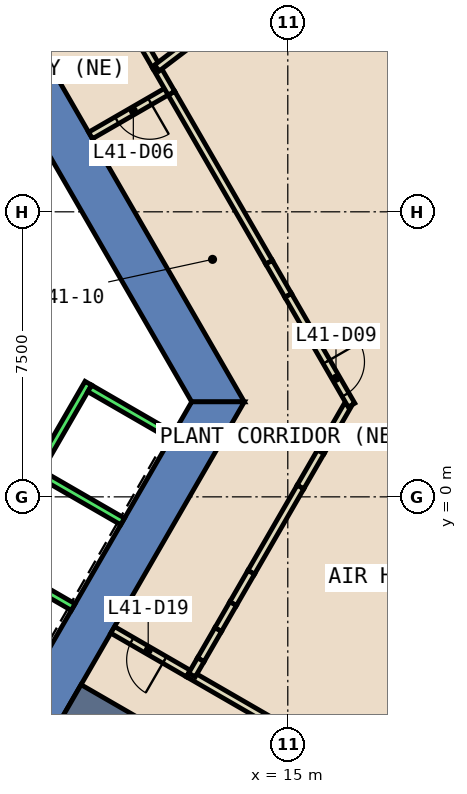
"""IFC4 building model, lengths in metres.
Left out: names, types, materials, properties, quantities, classifications, styles, units other than length and angle.
Written with IfcOpenShell. Run it as: python <this file> out.ifc"""

import sys

from ifc_helpers import new_model, si_unit, direction, frame, frame_2d, origin, place, context, subcontext, project, spatial, polyline, rectangle, outline, extrude, element, fill, save


model = new_model("IFC4")
c1 = context("Model", 3, precision=1e-05, world=origin(), true_north=direction((0.0, 1.0)))
c2 = subcontext(c1, "Body", "Model", "MODEL_VIEW")
j1 = project(units=[si_unit("LENGTHUNIT", "METRE"), si_unit("PLANEANGLEUNIT", "RADIAN")], contexts=[c1])
p1 = place(None, origin())
s1 = spatial("IfcSite", under=j1, at=p1, CompositionType="ELEMENT")
p2 = place(p1, origin())
s2 = spatial("IfcBuilding", under=s1, at=p2, CompositionType="ELEMENT")
p3 = place(p2, frame((0.0, 0.0, 184.4)))
s3 = spatial("IfcBuildingStorey", under=s2, at=p3, CompositionType="ELEMENT", Elevation=184.4)
p4 = place(p3, frame((0.0, 0.0, -0.6)))
e1 = element("IfcWall", 1, at=p4, inside=s3, PredefinedType="SHEAR", context=c2, shape_type="SweptSolid", body=[
    extrude(outline(polyline([(8.517, 11.747), (7.478, 11.147), (12.471, 2.5), (13.856, 2.5), (8.517, 11.747)])), origin(), (0.0, 0.0, 1.0), 5.4),
])
p5 = place(p3, frame((0.0, 0.0, -0.6)))
e2 = element("IfcWall", 2, at=p5, inside=s3, PredefinedType="SHEAR", context=c2, shape_type="SweptSolid", body=[
    extrude(outline(polyline([(6.928, -9.5), (13.856, 2.5), (12.471, 2.5), (6.235, -8.3), (6.928, -9.5)])), origin(), (0.0, 0.0, 1.0), 5.4),
])
p6 = place(p3, frame((9.31, -5.375, 0.0), z_axis=(0.0, 0.0, 1.0), x_axis=(0.866015103238, -0.500017840646, 0.0)))
e3 = element("IfcWall", 3, at=p6, inside=s3, PredefinedType="SHEAR", context=c2, shape_type="SweptSolid", body=[
    extrude(rectangle(XDim=27.139, YDim=1.0, at=frame_2d((13.57, 0.0))), origin(), (0.0, 0.0, 1.0), 4.8),
])
p7 = place(p3, frame((12.384, -4.65, 0.0), z_axis=(0.0, 0.0, 1.0), x_axis=(-0.866053019151, 0.499952165731, 0.0)))
e4 = element("IfcWall", 4, at=p7, inside=s3, PredefinedType="PARTITIONING", context=c2, shape_type="SweptSolid", body=[
    extrude(rectangle(XDim=2.3, YDim=0.2, at=frame_2d((1.15, 0.0))), origin(), (0.0, 0.0, 1.0), 4.8),
])
p8 = place(p7, frame((0.721, 0.0, 0.0)))
e5 = element("IfcOpeningElement", 5, at=p8, cuts=e4, PredefinedType="OPENING", context=c2, shape_type="SweptSolid", body=[
    extrude(rectangle(XDim=1.0, YDim=2.1, at=frame_2d((0.5, 1.05))), frame((0.0, 0.11, 0.0), z_axis=(0.0, -1.0, 0.0), x_axis=(1.0, 0.0, 0.0)), (0.0, 0.0, 1.0), 0.22),
])
p9 = place(p3, frame((12.384, -4.65, 0.0), z_axis=(0.0, 0.0, 1.0), x_axis=(0.866042267005, -0.499970790907, 0.0)))
e6 = element("IfcWall", 6, at=p9, inside=s3, PredefinedType="PARTITIONING", context=c2, shape_type="SweptSolid", body=[
    extrude(rectangle(XDim=25.02, YDim=0.2, at=frame_2d((12.51, 0.0))), origin(), (0.0, 0.0, 1.0), 4.8),
])
p10 = place(p3, frame((11.888, 10.709, 0.0), z_axis=(0.0, 0.0, 1.0), x_axis=(-0.865973769406, -0.500089422704, 0.0)))
e7 = element("IfcWall", 7, at=p10, inside=s3, PredefinedType="PARTITIONING", context=c2, shape_type="SweptSolid", body=[
    extrude(rectangle(XDim=2.399, YDim=0.2, at=frame_2d((1.2, 0.0))), origin(), (0.0, 0.0, 1.0), 2.4),
])
p11 = place(p10, frame((0.6, 0.0, 0.0)))
e8 = element("IfcOpeningElement", 8, at=p11, cuts=e7, PredefinedType="OPENING", context=c2, shape_type="SweptSolid", body=[
    extrude(rectangle(XDim=1.0, YDim=2.1, at=frame_2d((0.5, 1.05))), frame((0.0, 0.11, 0.0), z_axis=(0.0, -1.0, 0.0), x_axis=(1.0, 0.0, 0.0)), (0.0, 0.0, 1.0), 0.22),
])
p12 = place(p3, frame((11.938, 10.622, 0.0), z_axis=(0.0, 0.0, 1.0), x_axis=(0.500069357699, -0.865985356395, 0.0)))
e9 = element("IfcWall", 9, at=p12, inside=s3, PredefinedType="PARTITIONING", context=c2, shape_type="SweptSolid", body=[
    extrude(rectangle(XDim=5.137, YDim=0.2, at=frame_2d((2.569, 0.0))), origin(), (0.0, 0.0, 1.0), 2.4),
])
p13 = place(p3, frame((16.577, 2.413, 0.0), z_axis=(0.0, 0.0, 1.0), x_axis=(-0.499910949922, -0.866076810767, 0.0)))
e10 = element("IfcWall", 10, at=p13, inside=s3, PredefinedType="PARTITIONING", context=c2, shape_type="SweptSolid", body=[
    extrude(rectangle(XDim=1.42, YDim=0.2, at=frame_2d((0.71, 0.0))), origin(), (0.0, 0.0, 1.0), 4.8),
])
p14 = place(p3, frame((9.014, 15.687, 0.0), z_axis=(0.0, 0.0, 1.0), x_axis=(0.499967322677, -0.866044269224, 0.0)))
e11 = element("IfcWall", 11, at=p14, inside=s3, PredefinedType="PARTITIONING", context=c2, shape_type="SweptSolid", body=[
    extrude(rectangle(XDim=5.034, YDim=0.2, at=frame_2d((2.517, 0.0))), origin(), (0.0, 0.0, 1.0), 4.8),
])
p15 = place(p14, frame((1.303, 0.0, 0.0)))
e12 = element("IfcOpeningElement", 12, at=p15, cuts=e11, PredefinedType="OPENING", context=c2, shape_type="SweptSolid", body=[
    extrude(rectangle(XDim=1.0, YDim=2.1, at=frame_2d((0.5, 1.05))), frame((0.0, 0.11, 0.0), z_axis=(0.0, -1.0, 0.0), x_axis=(1.0, 0.0, 0.0)), (0.0, 0.0, 1.0), 0.22),
])
p16 = place(p3, frame((11.531, 11.327, 0.0), z_axis=(0.0, 0.0, 1.0), x_axis=(0.500042693391, -0.866000753341, 0.0)))
e13 = element("IfcWall", 13, at=p16, inside=s3, PredefinedType="PARTITIONING", context=c2, shape_type="SweptSolid", body=[
    extrude(rectangle(XDim=0.814, YDim=0.2, at=frame_2d((0.407, 0.0))), origin(), (0.0, 0.0, 1.0), 2.4),
])
p17 = place(p3, frame((14.507, 6.173, 0.0), z_axis=(0.0, 0.0, 1.0), x_axis=(0.499162960598, -0.86650812966, 0.0)))
e14 = element("IfcWall", 14, at=p17, inside=s3, PredefinedType="PARTITIONING", context=c2, shape_type="SweptSolid", body=[
    extrude(rectangle(XDim=1.008, YDim=0.2, at=frame_2d((0.504, 0.0))), origin(), (0.0, 0.0, 1.0), 2.4),
])
p18 = place(p3, frame((15.01, 5.3, 0.0), z_axis=(0.0, 0.0, 1.0), x_axis=(0.500045756281, -0.865998984772, 0.0)))
e15 = element("IfcWall", 15, at=p18, inside=s3, PredefinedType="PARTITIONING", context=c2, shape_type="SweptSolid", body=[
    extrude(rectangle(XDim=3.334, YDim=0.2, at=frame_2d((1.667, 0.0))), origin(), (0.0, 0.0, 1.0), 4.8),
])
p19 = place(p18, frame((2.016, 0.0, 0.0)))
e16 = element("IfcOpeningElement", 16, at=p19, cuts=e15, PredefinedType="OPENING", context=c2, shape_type="SweptSolid", body=[
    extrude(rectangle(XDim=1.0, YDim=2.1, at=frame_2d((0.5, 1.05))), frame((0.0, 0.11, 0.0), z_axis=(0.0, -1.0, 0.0), x_axis=(1.0, 0.0, 0.0)), (0.0, 0.0, 1.0), 0.22),
])
p20 = place(p3, frame((15.867, 1.183, 0.0), z_axis=(0.0, 0.0, 1.0), x_axis=(-0.499900536046, -0.86608282171, 0.0)))
e17 = element("IfcWall", 17, at=p20, inside=s3, PredefinedType="PARTITIONING", context=c2, shape_type="SweptSolid", body=[
    extrude(rectangle(XDim=1.068, YDim=0.2, at=frame_2d((0.534, 0.0))), origin(), (0.0, 0.0, 1.0), 2.4),
])
p21 = place(p3, frame((15.333, 0.258, 0.0), z_axis=(0.0, 0.0, 1.0), x_axis=(-0.500070396748, -0.865984756388, 0.0)))
e18 = element("IfcWall", 18, at=p21, inside=s3, PredefinedType="PARTITIONING", context=c2, shape_type="SweptSolid", body=[
    extrude(rectangle(XDim=2.592, YDim=0.2, at=frame_2d((1.296, 0.0))), origin(), (0.0, 0.0, 1.0), 4.8),
])
p22 = place(p3, frame((14.037, -1.986, 0.0), z_axis=(0.0, 0.0, 1.0), x_axis=(-0.4998334002, -0.86612156886, 0.0)))
e19 = element("IfcWall", 19, at=p22, inside=s3, PredefinedType="PARTITIONING", context=c2, shape_type="SweptSolid", body=[
    extrude(rectangle(XDim=0.952, YDim=0.2, at=frame_2d((0.476, 0.0))), origin(), (0.0, 0.0, 1.0), 2.4),
])
p23 = place(p3, frame((13.561, -2.811, 0.0), z_axis=(0.0, 0.0, 1.0), x_axis=(-0.499409130319, -0.866366273901, 0.0)))
e20 = element("IfcWall", 20, at=p23, inside=s3, PredefinedType="PARTITIONING", context=c2, shape_type="SweptSolid", body=[
    extrude(rectangle(XDim=0.787, YDim=0.2, at=frame_2d((0.394, 0.0))), origin(), (0.0, 0.0, 1.0), 4.8),
])
p24 = place(p3, frame((13.168, -3.493, 0.0), z_axis=(0.0, 0.0, 1.0), x_axis=(-0.500153222552, -0.865936922628, 0.0)))
e21 = element("IfcWall", 21, at=p24, inside=s3, PredefinedType="PARTITIONING", context=c2, shape_type="SweptSolid", body=[
    extrude(rectangle(XDim=0.916, YDim=0.2, at=frame_2d((0.458, 0.0))), origin(), (0.0, 0.0, 1.0), 2.4),
])
p25 = place(p3, frame((12.71, -4.286, 0.0), z_axis=(0.0, 0.0, 1.0), x_axis=(-0.500558482794, -0.8657027234, 0.0)))
e22 = element("IfcWall", 22, at=p25, inside=s3, PredefinedType="PARTITIONING", context=c2, shape_type="SweptSolid", body=[
    extrude(rectangle(XDim=0.463, YDim=0.2, at=frame_2d((0.232, 0.0))), origin(), (0.0, 0.0, 1.0), 4.8),
])
p26 = place(p3, frame((15.455, 14.249, 0.0), z_axis=(0.0, 0.0, 1.0), x_axis=(-0.796089188828, -0.605179315106, 0.0)))
e23 = element("IfcWall", 23, at=p26, inside=s3, PredefinedType="PARTITIONING", context=c2, shape_type="SweptSolid", body=[
    extrude(rectangle(XDim=4.898, YDim=0.2, at=frame_2d((2.449, 0.0))), origin(), (0.0, 0.0, 1.0), 2.4),
])
p27 = place(p3, frame((4.451, -6.19, 0.0), z_axis=(0.0, 0.0, 1.0), x_axis=(0.50000090737, 0.866024879913, 0.0)))
e24 = element("IfcWall", 24, at=p27, inside=s3, PredefinedType="STANDARD", context=c2, shape_type="SweptSolid", body=[
    extrude(rectangle(XDim=10.6, YDim=0.2, at=frame_2d((5.3, 0.0))), origin(), (0.0, 0.0, 1.0), 4.8),
])
for number, where, z_axis, x_axis in (
    (25, (7.188, -1.65, 0.0), (0.0, 0.0, 1.0), (0.866, -0.5, 0.0)),
    (26, (8.488, 0.602, 0.0), (0.0, 0.0, 1.0), (0.866, -0.5, 0.0)),
):
    element("IfcWall", number, at=place(p3, frame(where, z_axis=z_axis, x_axis=x_axis)), inside=s3, PredefinedType="STANDARD", context=c2, shape_type="SweptSolid", body=[
        extrude(rectangle(XDim=2.5, YDim=0.2, at=frame_2d((1.25, 0.0))), origin(), (0.0, 0.0, 1.0), 4.8),
    ])
p28 = place(p3, frame((9.788, 2.853, 0.0), z_axis=(0.0, 0.0, 1.0), x_axis=(0.865998541277, -0.500046524342, 0.0)))
e27 = element("IfcWall", 27, at=p28, inside=s3, PredefinedType="STANDARD", context=c2, shape_type="SweptSolid", body=[
    extrude(rectangle(XDim=2.5, YDim=0.2, at=frame_2d((1.25, 0.0))), origin(), (0.0, 0.0, 1.0), 4.8),
])
p29 = place(p11, origin())
e28 = element("IfcDoor", 28, at=p29, inside=s3, OperationType="SINGLE_SWING_RIGHT", PredefinedType="DOOR", context=c2, shape_type="SweptSolid", body=[
    extrude(rectangle(XDim=1.0, YDim=2.1, at=frame_2d((0.5, 1.05))), frame((0.0, 0.025, 0.0), z_axis=(0.0, -1.0, 0.0), x_axis=(1.0, 0.0, 0.0)), (0.0, 0.0, 1.0), 0.05),
])
fill(e8, e28)
p30 = place(p19, origin())
e29 = element("IfcDoor", 29, at=p30, inside=s3, OperationType="SINGLE_SWING_LEFT", PredefinedType="DOOR", context=c2, shape_type="SweptSolid", body=[
    extrude(rectangle(XDim=1.0, YDim=2.1, at=frame_2d((0.5, 1.05))), frame((0.0, 0.025, 0.0), z_axis=(0.0, -1.0, 0.0), x_axis=(1.0, 0.0, 0.0)), (0.0, 0.0, 1.0), 0.05),
])
fill(e16, e29)
p31 = place(p8, origin())
e30 = element("IfcDoor", 30, at=p31, inside=s3, OperationType="SINGLE_SWING_LEFT", PredefinedType="DOOR", context=c2, shape_type="SweptSolid", body=[
    extrude(rectangle(XDim=1.0, YDim=2.1, at=frame_2d((0.5, 1.05))), frame((0.0, 0.025, 0.0), z_axis=(0.0, -1.0, 0.0), x_axis=(1.0, 0.0, 0.0)), (0.0, 0.0, 1.0), 0.05),
])
fill(e5, e30)
save(model, sys.argv[1])
